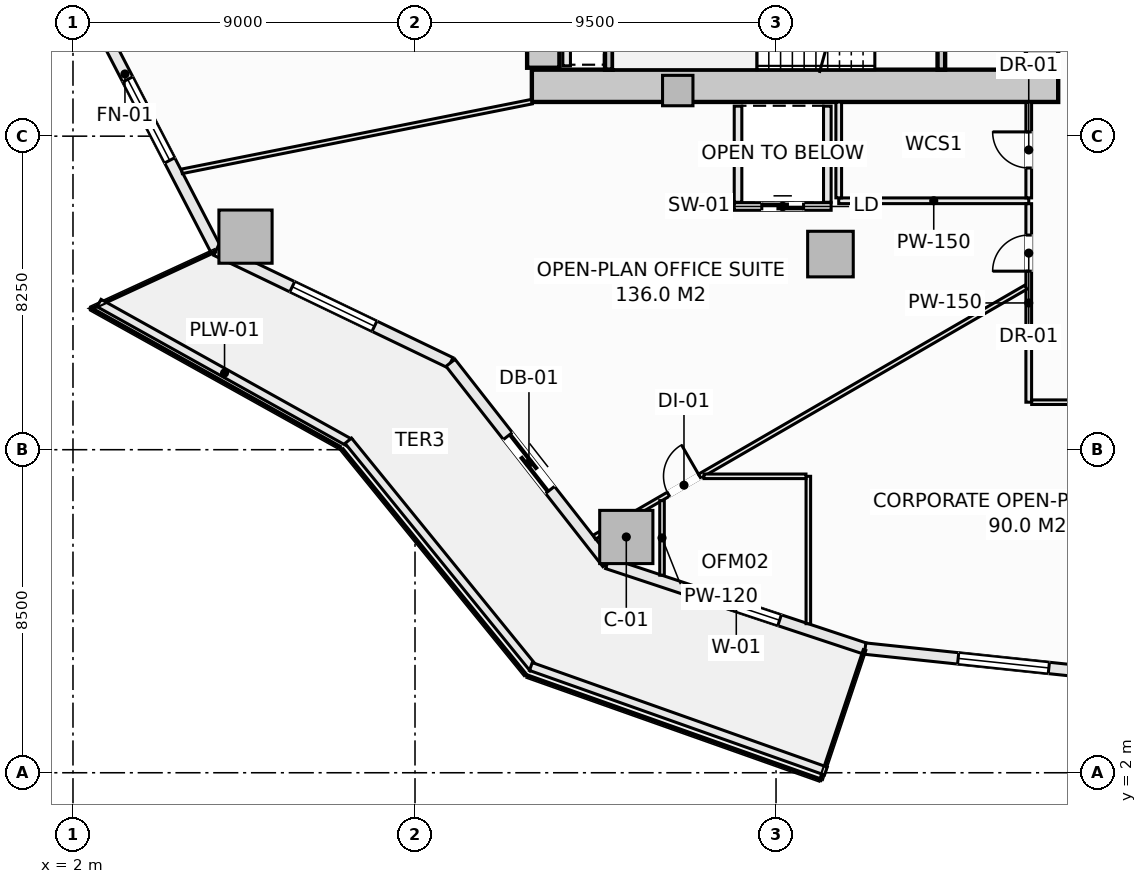
"""IFC4 building model, lengths in metres.
Left out: names, types, materials, properties, quantities, classifications, styles, units other than length and angle.
Written with IfcOpenShell. Run it as: python <this file> out.ifc"""

import sys

from ifc_helpers import new_model, si_unit, direction, frame, frame_2d, origin, origin_2d, place, context, subcontext, project, spatial, rectangle, extrude, element, fill, save


model = new_model("IFC4")
c1 = context("Model", 3, precision=1e-05, world=origin(), true_north=direction((0.0, 1.0)))
c2 = subcontext(c1, "Body", "Model", "MODEL_VIEW")
j1 = project(units=[si_unit("LENGTHUNIT", "METRE"), si_unit("PLANEANGLEUNIT", "RADIAN")], contexts=[c1])
p1 = place(None, origin())
s1 = spatial("IfcSite", under=j1, at=p1, CompositionType="ELEMENT")
p2 = place(p1, origin())
s2 = spatial("IfcBuilding", under=s1, at=p2, CompositionType="ELEMENT")
p3 = place(p2, frame((0.0, 0.0, 26.5)))
s3 = spatial("IfcBuildingStorey", under=s2, at=p3, CompositionType="ELEMENT", Elevation=26.5)
p4 = place(p3, frame((14.075, 20.075, -0.28), z_axis=(0.0, 0.0, 1.0), x_axis=(1.0, 0.0, 0.0)))
e1 = element("IfcWall", 1, at=p4, inside=s3, PredefinedType="SHEAR", context=c2, shape_type="SweptSolid", body=[
    extrude(rectangle(XDim=13.85, YDim=0.85, at=frame_2d((6.925, 0.0))), origin(), (0.0, 0.0, 1.0), 3.85),
])
p5 = place(p3, frame((14.375, 20.55, -0.28), z_axis=(0.0, 0.0, 1.0), x_axis=(0.0, 1.0, 0.0)))
e2 = element("IfcWall", 2, at=p5, inside=s3, PredefinedType="SHEAR", context=c2, shape_type="SweptSolid", body=[
    extrude(rectangle(XDim=12.9, YDim=0.85, at=frame_2d((6.45, 0.0))), origin(), (0.0, 0.0, 1.0), 3.85),
])
p6 = place(p3, frame((27.5, 20.55, -0.28), z_axis=(0.0, 0.0, 1.0), x_axis=(0.0, 1.0, 0.0)))
e3 = element("IfcWall", 3, at=p6, inside=s3, PredefinedType="SHEAR", context=c2, shape_type="SweptSolid", body=[
    extrude(rectangle(XDim=1.5, YDim=0.85, at=frame_2d((0.75, 0.0))), origin(), (0.0, 0.0, 1.0), 3.85),
])
for number, where, z_axis, x_axis in (
    (4, (6.54, 16.106, -0.28), (0.0, 0.0, 1.0), (1.0, 0.0, 0.0)),
    (5, (16.56, 8.204, -0.28), (0.0, 0.0, 1.0), (1.0, 0.0, 0.0)),
):
    element("IfcColumn", number, at=place(p3, frame(where, z_axis=z_axis, x_axis=x_axis)), inside=s3, PredefinedType="COLUMN", context=c2, shape_type="SweptSolid", body=[
        extrude(rectangle(XDim=1.4, YDim=1.4, at=origin_2d()), origin(), (0.0, 0.0, 1.0), 3.85),
    ])
p7 = place(p3, frame((21.932, 15.648, -0.28), z_axis=(0.0, 0.0, 1.0), x_axis=(1.0, 0.0, 0.0)))
e6 = element("IfcColumn", 6, at=p7, inside=s3, PredefinedType="COLUMN", context=c2, shape_type="SweptSolid", body=[
    extrude(rectangle(XDim=1.2, YDim=1.2, at=origin_2d()), origin(), (0.0, 0.0, 1.0), 3.85),
])
p8 = place(p3, frame((17.914, 19.95, -0.28), z_axis=(0.0, 0.0, 1.0), x_axis=(1.0, 0.0, 0.0)))
e7 = element("IfcColumn", 7, at=p8, inside=s3, PredefinedType="PILASTER", context=c2, shape_type="SweptSolid", body=[
    extrude(rectangle(XDim=0.8, YDim=0.8, at=origin_2d()), origin(), (0.0, 0.0, 1.0), 3.85),
])
p9 = place(p3, frame((2.958, 21.177, 0.0), z_axis=(0.0, 0.0, 1.0), x_axis=(0.459809804413, -0.88801742312, 0.0)))
e8 = element("IfcWall", 8, at=p9, inside=s3, PredefinedType="SOLIDWALL", context=c2, shape_type="SweptSolid", body=[
    extrude(rectangle(XDim=6.111, YDim=0.3, at=frame_2d((3.055, 0.0))), origin(), (0.0, 0.0, 1.0), 3.093),
])
p10 = place(p9, frame((1.05, 0.0, 0.85)))
e9 = element("IfcOpeningElement", 9, at=p10, cuts=e8, PredefinedType="OPENING", context=c2, shape_type="SweptSolid", body=[
    extrude(rectangle(XDim=2.4, YDim=1.9, at=frame_2d((1.2, 0.95))), frame((0.0, 0.16, 0.0), z_axis=(0.0, -1.0, 0.0), x_axis=(1.0, 0.0, 0.0)), (0.0, 0.0, 1.0), 0.32),
])
p11 = place(p3, frame((5.768, 15.75, 0.0), z_axis=(0.0, 0.0, 1.0), x_axis=(0.901360393999, -0.433069786673, 0.0)))
e10 = element("IfcWall", 10, at=p11, inside=s3, PredefinedType="SOLIDWALL", context=c2, shape_type="SweptSolid", body=[
    extrude(rectangle(XDim=6.842, YDim=0.3, at=frame_2d((3.421, 0.0))), origin(), (0.0, 0.0, 1.0), 3.093),
])
p12 = place(p11, frame((2.221, 0.0, 0.85)))
e11 = element("IfcOpeningElement", 11, at=p12, cuts=e10, PredefinedType="OPENING", context=c2, shape_type="SweptSolid", body=[
    extrude(rectangle(XDim=2.4, YDim=1.9, at=frame_2d((1.2, 0.95))), frame((0.0, 0.16, 0.0), z_axis=(0.0, -1.0, 0.0), x_axis=(1.0, 0.0, 0.0)), (0.0, 0.0, 1.0), 0.32),
])
p13 = place(p3, frame((11.935, 12.787, 0.0), z_axis=(0.0, 0.0, 1.0), x_axis=(0.616421309777, -0.787416515482, 0.0)))
e12 = element("IfcWall", 12, at=p13, inside=s3, PredefinedType="SOLIDWALL", context=c2, shape_type="SweptSolid", body=[
    extrude(rectangle(XDim=6.696, YDim=0.3, at=frame_2d((3.348, 0.0))), origin(), (0.0, 0.0, 1.0), 3.093),
])
p14 = place(p13, frame((2.448, 0.0, 0.0)))
e13 = element("IfcOpeningElement", 13, at=p14, cuts=e12, PredefinedType="OPENING", context=c2, shape_type="SweptSolid", body=[
    extrude(rectangle(XDim=1.8, YDim=2.25, at=frame_2d((0.9, 1.125))), frame((0.0, 0.16, 0.0), z_axis=(0.0, -1.0, 0.0), x_axis=(1.0, 0.0, 0.0)), (0.0, 0.0, 1.0), 0.32),
])
p15 = place(p3, frame((16.062, 7.514, 0.0), z_axis=(0.0, 0.0, 1.0), x_axis=(0.949238715533, -0.31455661006, 0.0)))
e14 = element("IfcWall", 14, at=p15, inside=s3, PredefinedType="SOLIDWALL", context=c2, shape_type="SweptSolid", body=[
    extrude(rectangle(XDim=7.146, YDim=0.3, at=frame_2d((3.573, 0.0))), origin(), (0.0, 0.0, 1.0), 3.093),
])
p16 = place(p15, frame((2.373, 0.0, 0.85)))
e15 = element("IfcOpeningElement", 15, at=p16, cuts=e14, PredefinedType="OPENING", context=c2, shape_type="SweptSolid", body=[
    extrude(rectangle(XDim=2.4, YDim=1.9, at=frame_2d((1.2, 0.95))), frame((0.0, 0.16, 0.0), z_axis=(0.0, -1.0, 0.0), x_axis=(1.0, 0.0, 0.0)), (0.0, 0.0, 1.0), 0.32),
])
p17 = place(p3, frame((22.846, 5.267, 0.0), z_axis=(0.0, 0.0, 1.0), x_axis=(0.994500334317, -0.104733399844, 0.0)))
e16 = element("IfcWall", 16, at=p17, inside=s3, PredefinedType="SOLIDWALL", context=c2, shape_type="SweptSolid", body=[
    extrude(rectangle(XDim=7.32, YDim=0.3, at=frame_2d((3.66, 0.0))), origin(), (0.0, 0.0, 1.0), 3.093),
])
p18 = place(p17, frame((2.46, 0.0, 0.85)))
e17 = element("IfcOpeningElement", 17, at=p18, cuts=e16, PredefinedType="OPENING", context=c2, shape_type="SweptSolid", body=[
    extrude(rectangle(XDim=2.4, YDim=1.9, at=frame_2d((1.2, 0.95))), frame((0.0, 0.16, 0.0), z_axis=(0.0, -1.0, 0.0), x_axis=(1.0, 0.0, 0.0)), (0.0, 0.0, 1.0), 0.32),
])
p19 = place(p3, frame((2.685, 14.359, 0.0), z_axis=(0.0, 0.0, 1.0), x_axis=(0.873500119739, -0.48682393205, 0.0)))
e18 = element("IfcWall", 18, at=p19, inside=s3, PredefinedType="PARAPET", context=c2, shape_type="SweptSolid", body=[
    extrude(rectangle(XDim=7.562, YDim=0.22, at=frame_2d((3.781, 0.0))), origin(), (0.0, 0.0, 1.0), 0.52),
])
p20 = place(p3, frame((9.244, 10.736, 0.0), z_axis=(0.0, 0.0, 1.0), x_axis=(0.630997450658, -0.775784903993, 0.0)))
e19 = element("IfcWall", 19, at=p20, inside=s3, PredefinedType="PARAPET", context=c2, shape_type="SweptSolid", body=[
    extrude(rectangle(XDim=7.718, YDim=0.22, at=frame_2d((3.859, 0.0))), origin(), (0.0, 0.0, 1.0), 0.52),
])
p21 = place(p3, frame((14.049, 4.795, 0.0), z_axis=(0.0, 0.0, 1.0), x_axis=(0.942581348797, -0.333976647237, 0.0)))
e20 = element("IfcWall", 20, at=p21, inside=s3, PredefinedType="PARAPET", context=c2, shape_type="SweptSolid", body=[
    extrude(rectangle(XDim=8.236, YDim=0.22, at=frame_2d((4.118, 0.0))), origin(), (0.0, 0.0, 1.0), 0.52),
])
p22 = place(p3, frame((24.85, 20.502, -0.28), z_axis=(0.0, 0.0, 1.0), x_axis=(0.0, 1.0, 0.0)))
e21 = element("IfcWall", 21, at=p22, inside=s3, PredefinedType="SHEAR", context=c2, shape_type="SweptSolid", body=[
    extrude(rectangle(XDim=3.038, YDim=0.2, at=frame_2d((1.519, 0.0))), origin(), (0.0, 0.0, 1.0), 3.85),
])
p23 = place(p22, frame((0.969, 0.0, 0.28)))
e22 = element("IfcOpeningElement", 22, at=p23, cuts=e21, PredefinedType="OPENING", context=c2, shape_type="SweptSolid", body=[
    extrude(rectangle(XDim=1.1, YDim=2.15, at=frame_2d((0.55, 1.075))), frame((0.0, 0.11, 0.0), z_axis=(0.0, -1.0, 0.0), x_axis=(1.0, 0.0, 0.0)), (0.0, 0.0, 1.0), 0.22),
])
p24 = place(p3, frame((16.1, 20.502, -0.28), z_axis=(0.0, 0.0, 1.0), x_axis=(0.0, 1.0, 0.0)))
e23 = element("IfcWall", 23, at=p24, inside=s3, PredefinedType="SHEAR", context=c2, shape_type="SweptSolid", body=[
    extrude(rectangle(XDim=3.036, YDim=0.2, at=frame_2d((1.518, 0.0))), origin(), (0.0, 0.0, 1.0), 3.85),
])
p25 = place(p3, frame((19.4, 16.9, 0.0), z_axis=(0.0, 0.0, 1.0), x_axis=(1.0, 0.0, 0.0)))
e24 = element("IfcWall", 24, at=p25, inside=s3, PredefinedType="SOLIDWALL", context=c2, shape_type="SweptSolid", body=[
    extrude(rectangle(XDim=2.55, YDim=0.2, at=frame_2d((1.275, 0.0))), origin(), (0.0, 0.0, 1.0), 3.57),
])
p26 = place(p25, frame((0.725, 0.0, 0.0)))
e25 = element("IfcOpeningElement", 25, at=p26, cuts=e24, PredefinedType="OPENING", context=c2, shape_type="SweptSolid", body=[
    extrude(rectangle(XDim=1.1, YDim=2.2, at=frame_2d((0.55, 1.1))), frame((0.0, 0.11, 0.0), z_axis=(0.0, -1.0, 0.0), x_axis=(1.0, 0.0, 0.0)), (0.0, 0.0, 1.0), 0.22),
])
for number, where, z_axis, x_axis in (
    (26, (19.5, 17.01, 0.0), (0.0, 0.0, 1.0), (0.0, 1.0, 0.0)),
    (27, (21.85, 17.01, 0.0), (0.0, 0.0, 1.0), (0.0, 1.0, 0.0)),
):
    element("IfcWall", number, at=place(p3, frame(where, z_axis=z_axis, x_axis=x_axis)), inside=s3, PredefinedType="SOLIDWALL", context=c2, shape_type="SweptSolid", body=[
        extrude(rectangle(XDim=2.53, YDim=0.2, at=frame_2d((1.265, 0.0))), origin(), (0.0, 0.0, 1.0), 3.57),
    ])
p27 = place(p3, frame((14.99, 20.6, 0.0), z_axis=(0.0, 0.0, 1.0), x_axis=(0.0, 1.0, 0.0)))
e28 = element("IfcWall", 28, at=p27, inside=s3, PredefinedType="SOLIDWALL", context=c2, shape_type="SweptSolid", body=[
    extrude(rectangle(XDim=2.85, YDim=0.2, at=frame_2d((1.425, 0.0))), origin(), (0.0, 0.0, 1.0), 3.57),
])
p28 = place(p3, frame((22.15, 17.05, 0.0), z_axis=(0.0, 0.0, 1.0), x_axis=(1.0, 0.0, 0.0)))
e29 = element("IfcWall", 29, at=p28, inside=s3, PredefinedType="PARTITIONING", context=c2, shape_type="SweptSolid", body=[
    extrude(rectangle(XDim=5.0, YDim=0.15, at=frame_2d((2.5, 0.0))), origin(), (0.0, 0.0, 1.0), 3.57),
])
p29 = place(p3, frame((22.15, 17.127, 0.0), z_axis=(0.0, 0.0, 1.0), x_axis=(0.0, 1.0, 0.0)))
e30 = element("IfcWall", 30, at=p29, inside=s3, PredefinedType="PARTITIONING", context=c2, shape_type="SweptSolid", body=[
    extrude(rectangle(XDim=2.521, YDim=0.15, at=frame_2d((1.26, 0.0))), origin(), (0.0, 0.0, 1.0), 3.57),
])
p30 = place(p3, frame((27.15, 11.75, 0.0), z_axis=(0.0, 0.0, 1.0), x_axis=(0.0, 1.0, 0.0)))
e31 = element("IfcWall", 31, at=p30, inside=s3, PredefinedType="PARTITIONING", context=c2, shape_type="SweptSolid", body=[
    extrude(rectangle(XDim=5.223, YDim=0.15, at=frame_2d((2.611, 0.0))), origin(), (0.0, 0.0, 1.0), 3.57),
])
p31 = place(p30, frame((3.448, 0.0, 0.0)))
e32 = element("IfcOpeningElement", 32, at=p31, cuts=e31, PredefinedType="OPENING", context=c2, shape_type="SweptSolid", body=[
    extrude(rectangle(XDim=0.95, YDim=2.1, at=frame_2d((0.475, 1.05))), frame((0.0, 0.085, 0.0), z_axis=(0.0, -1.0, 0.0), x_axis=(1.0, 0.0, 0.0)), (0.0, 0.0, 1.0), 0.17),
])
p32 = place(p3, frame((27.15, 17.127, 0.0), z_axis=(0.0, 0.0, 1.0), x_axis=(0.0, 1.0, 0.0)))
e33 = element("IfcWall", 33, at=p32, inside=s3, PredefinedType="PARTITIONING", context=c2, shape_type="SweptSolid", body=[
    extrude(rectangle(XDim=2.521, YDim=0.15, at=frame_2d((1.26, 0.0))), origin(), (0.0, 0.0, 1.0), 3.57),
])
p33 = place(p32, frame((0.785, 0.0, 0.0)))
e34 = element("IfcOpeningElement", 34, at=p33, cuts=e33, PredefinedType="OPENING", context=c2, shape_type="SweptSolid", body=[
    extrude(rectangle(XDim=0.95, YDim=2.1, at=frame_2d((0.475, 1.05))), frame((0.0, 0.085, 0.0), z_axis=(0.0, -1.0, 0.0), x_axis=(1.0, 0.0, 0.0)), (0.0, 0.0, 1.0), 0.17),
])
p34 = place(p3, frame((27.227, 11.75, 0.0), z_axis=(0.0, 0.0, 1.0), x_axis=(1.0, 0.0, 0.0)))
e35 = element("IfcWall", 35, at=p34, inside=s3, PredefinedType="PARTITIONING", context=c2, shape_type="SweptSolid", body=[
    extrude(rectangle(XDim=8.661, YDim=0.12, at=frame_2d((4.331, 0.0))), origin(), (0.0, 0.0, 1.0), 3.57),
])
p35 = place(p34, frame((1.923, 0.0, 0.0)))
e36 = element("IfcOpeningElement", 36, at=p35, cuts=e35, PredefinedType="OPENING", context=c2, shape_type="SweptSolid", body=[
    extrude(rectangle(XDim=0.95, YDim=2.1, at=frame_2d((0.475, 1.05))), frame((0.0, 0.07, 0.0), z_axis=(0.0, -1.0, 0.0), x_axis=(1.0, 0.0, 0.0)), (0.0, 0.0, 1.0), 0.14),
])
p36 = place(p34, frame((5.822, 0.0, 0.0)))
e37 = element("IfcOpeningElement", 37, at=p36, cuts=e35, PredefinedType="OPENING", context=c2, shape_type="SweptSolid", body=[
    extrude(rectangle(XDim=0.95, YDim=2.1, at=frame_2d((0.475, 1.05))), frame((0.0, 0.07, 0.0), z_axis=(0.0, -1.0, 0.0), x_axis=(1.0, 0.0, 0.0)), (0.0, 0.0, 1.0), 0.14),
])
p37 = place(p3, frame((4.865, 17.825, 0.0), z_axis=(0.0, 0.0, 1.0), x_axis=(0.980749298792, 0.195271126689, 0.0)))
e38 = element("IfcWall", 38, at=p37, inside=s3, PredefinedType="PARTITIONING", context=c2, shape_type="SweptSolid", body=[
    extrude(rectangle(XDim=9.391, YDim=0.12, at=frame_2d((4.695, 0.0))), origin(), (0.0, 0.0, 1.0), 3.57),
])
p38 = place(p3, frame((15.719, 8.2, 0.0), z_axis=(0.0, 0.0, 1.0), x_axis=(0.865375324019, 0.501124284563, 0.0)))
e39 = element("IfcWall", 39, at=p38, inside=s3, PredefinedType="PARTITIONING", context=c2, shape_type="SweptSolid", body=[
    extrude(rectangle(XDim=13.121, YDim=0.12, at=frame_2d((6.561, 0.0))), origin(), (0.0, 0.0, 1.0), 2.934),
])
p39 = place(p38, frame((2.251, 0.0, 0.0)))
e40 = element("IfcOpeningElement", 40, at=p39, cuts=e39, PredefinedType="OPENING", context=c2, shape_type="SweptSolid", body=[
    extrude(rectangle(XDim=0.95, YDim=2.1, at=frame_2d((0.475, 1.05))), frame((0.0, 0.07, 0.0), z_axis=(0.0, -1.0, 0.0), x_axis=(1.0, 0.0, 0.0)), (0.0, 0.0, 1.0), 0.14),
])
p40 = place(p3, frame((21.35, 5.922, 0.0), z_axis=(0.0, 0.0, 1.0), x_axis=(0.0, 1.0, 0.0)))
e41 = element("IfcWall", 41, at=p40, inside=s3, PredefinedType="PARTITIONING", context=c2, shape_type="SweptSolid", body=[
    extrude(rectangle(XDim=3.878, YDim=0.12, at=frame_2d((1.939, 0.0))), origin(), (0.0, 0.0, 1.0), 3.57),
])
p41 = place(p3, frame((18.605, 9.8, 0.0), z_axis=(0.0, 0.0, 1.0), x_axis=(1.0, 0.0, 0.0)))
e42 = element("IfcWall", 42, at=p41, inside=s3, PredefinedType="PARTITIONING", context=c2, shape_type="SweptSolid", body=[
    extrude(rectangle(XDim=2.683, YDim=0.12, at=frame_2d((1.342, 0.0))), origin(), (0.0, 0.0, 1.0), 3.57),
])
p42 = place(p3, frame((17.5, 7.198, 0.0), z_axis=(0.0, 0.0, 1.0), x_axis=(0.0, 1.0, 0.0)))
e43 = element("IfcWall", 43, at=p42, inside=s3, PredefinedType="PARTITIONING", context=c2, shape_type="SweptSolid", body=[
    extrude(rectangle(XDim=1.962, YDim=0.12, at=frame_2d((0.981, 0.0))), origin(), (0.0, 0.0, 1.0), 2.934),
])
p43 = place(p10, origin())
e44 = element("IfcWindow", 44, at=p43, inside=s3, PartitioningType="SINGLE_PANEL", PredefinedType="WINDOW", context=c2, shape_type="SweptSolid", body=[
    extrude(rectangle(XDim=2.4, YDim=1.9, at=frame_2d((1.2, 0.95))), frame((0.0, 0.03, 0.0), z_axis=(0.0, -1.0, 0.0), x_axis=(1.0, 0.0, 0.0)), (0.0, 0.0, 1.0), 0.06),
])
fill(e9, e44)
p44 = place(p12, origin())
e45 = element("IfcWindow", 45, at=p44, inside=s3, PartitioningType="SINGLE_PANEL", PredefinedType="WINDOW", context=c2, shape_type="SweptSolid", body=[
    extrude(rectangle(XDim=2.4, YDim=1.9, at=frame_2d((1.2, 0.95))), frame((0.0, 0.03, 0.0), z_axis=(0.0, -1.0, 0.0), x_axis=(1.0, 0.0, 0.0)), (0.0, 0.0, 1.0), 0.06),
])
fill(e11, e45)
p45 = place(p14, frame((1.8, 0.0, 0.0), z_axis=(0.0, 0.0, 1.0), x_axis=(-1.0, 0.0, 0.0)))
e46 = element("IfcDoor", 46, at=p45, inside=s3, OperationType="SLIDING_TO_LEFT", PredefinedType="DOOR", context=c2, shape_type="SweptSolid", body=[
    extrude(rectangle(XDim=1.8, YDim=2.25, at=frame_2d((0.9, 1.125))), frame((0.0, 0.025, 0.0), z_axis=(0.0, -1.0, 0.0), x_axis=(1.0, 0.0, 0.0)), (0.0, 0.0, 1.0), 0.05),
])
fill(e13, e46)
p46 = place(p16, origin())
e47 = element("IfcWindow", 47, at=p46, inside=s3, PartitioningType="SINGLE_PANEL", PredefinedType="WINDOW", context=c2, shape_type="SweptSolid", body=[
    extrude(rectangle(XDim=2.4, YDim=1.9, at=frame_2d((1.2, 0.95))), frame((0.0, 0.03, 0.0), z_axis=(0.0, -1.0, 0.0), x_axis=(1.0, 0.0, 0.0)), (0.0, 0.0, 1.0), 0.06),
])
fill(e15, e47)
p47 = place(p18, origin())
e48 = element("IfcWindow", 48, at=p47, inside=s3, PartitioningType="SINGLE_PANEL", PredefinedType="WINDOW", context=c2, shape_type="SweptSolid", body=[
    extrude(rectangle(XDim=2.4, YDim=1.9, at=frame_2d((1.2, 0.95))), frame((0.0, 0.03, 0.0), z_axis=(0.0, -1.0, 0.0), x_axis=(1.0, 0.0, 0.0)), (0.0, 0.0, 1.0), 0.06),
])
fill(e17, e48)
p48 = place(p26, origin())
e49 = element("IfcDoor", 49, at=p48, inside=s3, OperationType="SLIDING_TO_LEFT", PredefinedType="DOOR", context=c2, shape_type="SweptSolid", body=[
    extrude(rectangle(XDim=1.1, YDim=2.2, at=frame_2d((0.55, 1.1))), frame((0.0, 0.025, 0.0), z_axis=(0.0, -1.0, 0.0), x_axis=(1.0, 0.0, 0.0)), (0.0, 0.0, 1.0), 0.05),
])
fill(e25, e49)
p49 = place(p33, origin())
e50 = element("IfcDoor", 50, at=p49, inside=s3, OperationType="SINGLE_SWING_RIGHT", PredefinedType="DOOR", context=c2, shape_type="SweptSolid", body=[
    extrude(rectangle(XDim=0.95, YDim=2.1, at=frame_2d((0.475, 1.05))), frame((0.0, 0.025, 0.0), z_axis=(0.0, -1.0, 0.0), x_axis=(1.0, 0.0, 0.0)), (0.0, 0.0, 1.0), 0.05),
])
fill(e34, e50)
p50 = place(p31, origin())
e51 = element("IfcDoor", 51, at=p50, inside=s3, OperationType="SINGLE_SWING_LEFT", PredefinedType="DOOR", context=c2, shape_type="SweptSolid", body=[
    extrude(rectangle(XDim=0.95, YDim=2.1, at=frame_2d((0.475, 1.05))), frame((0.0, 0.025, 0.0), z_axis=(0.0, -1.0, 0.0), x_axis=(1.0, 0.0, 0.0)), (0.0, 0.0, 1.0), 0.05),
])
fill(e32, e51)
p51 = place(p39, origin())
e52 = element("IfcDoor", 52, at=p51, inside=s3, OperationType="SINGLE_SWING_RIGHT", PredefinedType="DOOR", context=c2, shape_type="SweptSolid", body=[
    extrude(rectangle(XDim=0.95, YDim=2.1, at=frame_2d((0.475, 1.05))), frame((0.0, 0.025, 0.0), z_axis=(0.0, -1.0, 0.0), x_axis=(1.0, 0.0, 0.0)), (0.0, 0.0, 1.0), 0.05),
])
fill(e40, e52)
save(model, sys.argv[1])
